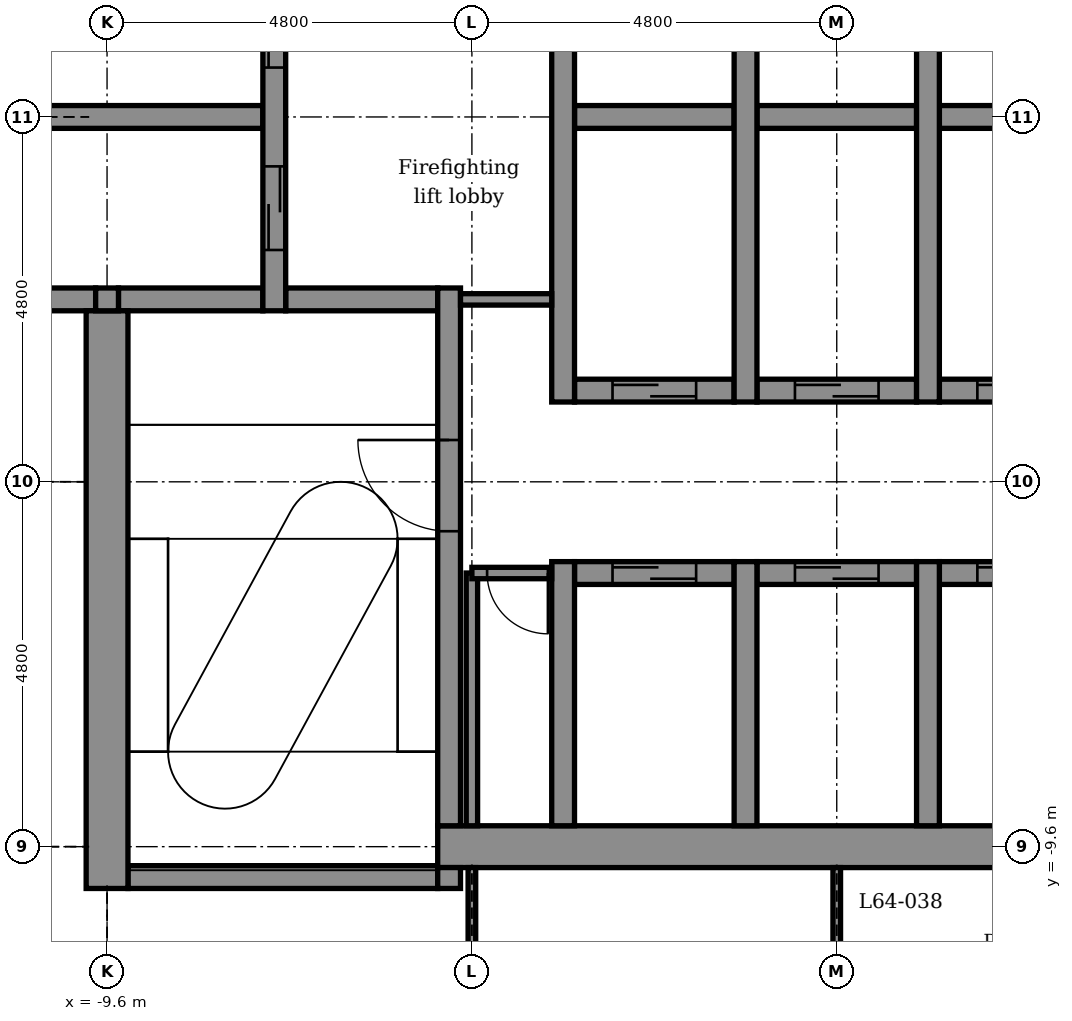
"""IFC4 building model, lengths in metres.
Left out: names, types, materials, properties, quantities, classifications, styles, units other than length and angle.
Written with IfcOpenShell. Run it as: python <this file> out.ifc"""

import sys

from ifc_helpers import new_model, si_unit, direction, frame, frame_2d, origin, place, context, subcontext, project, spatial, rectangle, extrude, element, fill, save


model = new_model("IFC4")
c1 = context("Model", 3, precision=1e-05, world=origin(), true_north=direction((0.0, 1.0)))
c2 = subcontext(c1, "Body", "Model", "MODEL_VIEW")
j1 = project(units=[si_unit("LENGTHUNIT", "METRE"), si_unit("PLANEANGLEUNIT", "RADIAN")], contexts=[c1])
p1 = place(None, origin())
s1 = spatial("IfcSite", under=j1, at=p1, CompositionType="ELEMENT")
p2 = place(p1, origin())
s2 = spatial("IfcBuilding", under=s1, at=p2, CompositionType="ELEMENT")
p3 = place(p2, frame((0.0, 0.0, 285.2)))
s3 = spatial("IfcBuildingStorey", under=s2, at=p3, CompositionType="ELEMENT", Elevation=285.2)
p4 = place(p3, frame((-9.325, -10.0, -0.15), z_axis=(0.0, 0.0, 1.0), x_axis=(1.0, 0.0, 0.0)))
e1 = element("IfcWall", 1, at=p4, inside=s3, PredefinedType="STANDARD", context=c2, shape_type="SweptSolid", body=[
    extrude(rectangle(XDim=4.075, YDim=0.3, at=frame_2d((2.038, 0.0))), origin(), (0.0, 0.0, 1.0), 3.9),
])
p5 = place(p3, frame((-5.25, -9.6, -0.15), z_axis=(0.0, 0.0, 1.0), x_axis=(1.0, 0.0, 0.0)))
e2 = element("IfcWall", 2, at=p5, inside=s3, PredefinedType="SHEAR", context=c2, shape_type="SweptSolid", body=[
    extrude(rectangle(XDim=10.2, YDim=0.55, at=frame_2d((5.1, 0.0))), origin(), (0.0, 0.0, 1.0), 3.9),
])
p6 = place(p5, frame((9.0, 0.0, 0.15)))
e3 = element("IfcOpeningElement", 3, at=p6, cuts=e2, PredefinedType="OPENING", context=c2, shape_type="SweptSolid", body=[
    extrude(rectangle(XDim=0.9, YDim=2.1, at=frame_2d((0.45, 1.05))), frame((0.0, 0.285, 0.0), z_axis=(0.0, -1.0, 0.0), x_axis=(1.0, 0.0, 0.0)), (0.0, 0.0, 1.0), 0.57),
])
p7 = place(p3, frame((-3.45, -6.0, -0.15), z_axis=(0.0, 0.0, 1.0), x_axis=(1.0, 0.0, 0.0)))
e4 = element("IfcWall", 4, at=p7, inside=s3, PredefinedType="STANDARD", context=c2, shape_type="SweptSolid", body=[
    extrude(rectangle(XDim=2.1, YDim=0.3, at=frame_2d((1.05, 0.0))), origin(), (0.0, 0.0, 1.0), 3.9),
])
p8 = place(p7, frame((0.5, 0.0, 0.15)))
e5 = element("IfcOpeningElement", 5, at=p8, cuts=e4, PredefinedType="OPENING", context=c2, shape_type="SweptSolid", body=[
    extrude(rectangle(XDim=1.1, YDim=2.1, at=frame_2d((0.55, 1.05))), frame((0.0, 0.16, 0.0), z_axis=(0.0, -1.0, 0.0), x_axis=(1.0, 0.0, 0.0)), (0.0, 0.0, 1.0), 0.32),
])
p9 = place(p3, frame((-1.05, -6.0, -0.15), z_axis=(0.0, 0.0, 1.0), x_axis=(1.0, 0.0, 0.0)))
e6 = element("IfcWall", 6, at=p9, inside=s3, PredefinedType="STANDARD", context=c2, shape_type="SweptSolid", body=[
    extrude(rectangle(XDim=2.1, YDim=0.3, at=frame_2d((1.05, 0.0))), origin(), (0.0, 0.0, 1.0), 3.9),
])
p10 = place(p9, frame((0.5, 0.0, 0.15)))
e7 = element("IfcOpeningElement", 7, at=p10, cuts=e6, PredefinedType="OPENING", context=c2, shape_type="SweptSolid", body=[
    extrude(rectangle(XDim=1.1, YDim=2.1, at=frame_2d((0.55, 1.05))), frame((0.0, 0.16, 0.0), z_axis=(0.0, -1.0, 0.0), x_axis=(1.0, 0.0, 0.0)), (0.0, 0.0, 1.0), 0.32),
])
p11 = place(p3, frame((1.35, -6.0, -0.15), z_axis=(0.0, 0.0, 1.0), x_axis=(1.0, 0.0, 0.0)))
e8 = element("IfcWall", 8, at=p11, inside=s3, PredefinedType="STANDARD", context=c2, shape_type="SweptSolid", body=[
    extrude(rectangle(XDim=2.1, YDim=0.3, at=frame_2d((1.05, 0.0))), origin(), (0.0, 0.0, 1.0), 3.9),
])
p12 = place(p11, frame((0.5, 0.0, 0.15)))
e9 = element("IfcOpeningElement", 9, at=p12, cuts=e8, PredefinedType="OPENING", context=c2, shape_type="SweptSolid", body=[
    extrude(rectangle(XDim=1.1, YDim=2.1, at=frame_2d((0.55, 1.05))), frame((0.0, 0.16, 0.0), z_axis=(0.0, -1.0, 0.0), x_axis=(1.0, 0.0, 0.0)), (0.0, 0.0, 1.0), 0.32),
])
p13 = place(p3, frame((-3.45, -3.6, -0.15), z_axis=(0.0, 0.0, 1.0), x_axis=(1.0, 0.0, 0.0)))
e10 = element("IfcWall", 10, at=p13, inside=s3, PredefinedType="STANDARD", context=c2, shape_type="SweptSolid", body=[
    extrude(rectangle(XDim=2.1, YDim=0.3, at=frame_2d((1.05, 0.0))), origin(), (0.0, 0.0, 1.0), 3.9),
])
p14 = place(p13, frame((0.5, 0.0, 0.15)))
e11 = element("IfcOpeningElement", 11, at=p14, cuts=e10, PredefinedType="OPENING", context=c2, shape_type="SweptSolid", body=[
    extrude(rectangle(XDim=1.1, YDim=2.1, at=frame_2d((0.55, 1.05))), frame((0.0, 0.16, 0.0), z_axis=(0.0, -1.0, 0.0), x_axis=(1.0, 0.0, 0.0)), (0.0, 0.0, 1.0), 0.32),
])
p15 = place(p3, frame((-1.05, -3.6, -0.15), z_axis=(0.0, 0.0, 1.0), x_axis=(1.0, 0.0, 0.0)))
e12 = element("IfcWall", 12, at=p15, inside=s3, PredefinedType="STANDARD", context=c2, shape_type="SweptSolid", body=[
    extrude(rectangle(XDim=2.1, YDim=0.3, at=frame_2d((1.05, 0.0))), origin(), (0.0, 0.0, 1.0), 3.9),
])
p16 = place(p15, frame((0.5, 0.0, 0.15)))
e13 = element("IfcOpeningElement", 13, at=p16, cuts=e12, PredefinedType="OPENING", context=c2, shape_type="SweptSolid", body=[
    extrude(rectangle(XDim=1.1, YDim=2.1, at=frame_2d((0.55, 1.05))), frame((0.0, 0.16, 0.0), z_axis=(0.0, -1.0, 0.0), x_axis=(1.0, 0.0, 0.0)), (0.0, 0.0, 1.0), 0.32),
])
p17 = place(p3, frame((1.35, -3.6, -0.15), z_axis=(0.0, 0.0, 1.0), x_axis=(1.0, 0.0, 0.0)))
e14 = element("IfcWall", 14, at=p17, inside=s3, PredefinedType="STANDARD", context=c2, shape_type="SweptSolid", body=[
    extrude(rectangle(XDim=2.1, YDim=0.3, at=frame_2d((1.05, 0.0))), origin(), (0.0, 0.0, 1.0), 3.9),
])
p18 = place(p17, frame((0.5, 0.0, 0.15)))
e15 = element("IfcOpeningElement", 15, at=p18, cuts=e14, PredefinedType="OPENING", context=c2, shape_type="SweptSolid", body=[
    extrude(rectangle(XDim=1.1, YDim=2.1, at=frame_2d((0.55, 1.05))), frame((0.0, 0.16, 0.0), z_axis=(0.0, -1.0, 0.0), x_axis=(1.0, 0.0, 0.0)), (0.0, 0.0, 1.0), 0.32),
])
p19 = place(p3, frame((-10.85, -2.4, -0.15), z_axis=(0.0, 0.0, 1.0), x_axis=(1.0, 0.0, 0.0)))
e16 = element("IfcWall", 16, at=p19, inside=s3, PredefinedType="STANDARD", context=c2, shape_type="SweptSolid", body=[
    extrude(rectangle(XDim=1.1, YDim=0.3, at=frame_2d((0.55, 0.0))), origin(), (0.0, 0.0, 1.0), 3.9),
])
p20 = place(p3, frame((-9.45, -2.4, -0.15), z_axis=(0.0, 0.0, 1.0), x_axis=(1.0, 0.0, 0.0)))
e17 = element("IfcWall", 17, at=p20, inside=s3, PredefinedType="STANDARD", context=c2, shape_type="SweptSolid", body=[
    extrude(rectangle(XDim=1.9, YDim=0.3, at=frame_2d((0.95, 0.0))), origin(), (0.0, 0.0, 1.0), 3.9),
])
p21 = place(p3, frame((-7.25, -2.4, -0.15), z_axis=(0.0, 0.0, 1.0), x_axis=(1.0, 0.0, 0.0)))
e18 = element("IfcWall", 18, at=p21, inside=s3, PredefinedType="STANDARD", context=c2, shape_type="SweptSolid", body=[
    extrude(rectangle(XDim=2.0, YDim=0.3, at=frame_2d((1.0, 0.0))), origin(), (0.0, 0.0, 1.0), 3.9),
])
p22 = place(p3, frame((-10.85, 0.0, -0.15), z_axis=(0.0, 0.0, 1.0), x_axis=(1.0, 0.0, 0.0)))
e19 = element("IfcWall", 19, at=p22, inside=s3, PredefinedType="STANDARD", context=c2, shape_type="SweptSolid", body=[
    extrude(rectangle(XDim=3.3, YDim=0.3, at=frame_2d((1.65, 0.0))), origin(), (0.0, 0.0, 1.0), 3.9),
])
p23 = place(p3, frame((-3.45, 0.0, -0.15), z_axis=(0.0, 0.0, 1.0), x_axis=(1.0, 0.0, 0.0)))
e20 = element("IfcWall", 20, at=p23, inside=s3, PredefinedType="STANDARD", context=c2, shape_type="SweptSolid", body=[
    extrude(rectangle(XDim=2.1, YDim=0.3, at=frame_2d((1.05, 0.0))), origin(), (0.0, 0.0, 1.0), 3.9),
])
p24 = place(p3, frame((-1.05, 0.0, -0.15), z_axis=(0.0, 0.0, 1.0), x_axis=(1.0, 0.0, 0.0)))
e21 = element("IfcWall", 21, at=p24, inside=s3, PredefinedType="STANDARD", context=c2, shape_type="SweptSolid", body=[
    extrude(rectangle(XDim=2.1, YDim=0.3, at=frame_2d((1.05, 0.0))), origin(), (0.0, 0.0, 1.0), 3.9),
])
p25 = place(p3, frame((1.35, 0.0, -0.15), z_axis=(0.0, 0.0, 1.0), x_axis=(1.0, 0.0, 0.0)))
e22 = element("IfcWall", 22, at=p25, inside=s3, PredefinedType="STANDARD", context=c2, shape_type="SweptSolid", body=[
    extrude(rectangle(XDim=2.1, YDim=0.3, at=frame_2d((1.05, 0.0))), origin(), (0.0, 0.0, 1.0), 3.9),
])
p26 = place(p3, frame((-9.6, -10.15, -0.15), z_axis=(0.0, 0.0, 1.0), x_axis=(0.0, 1.0, 0.0)))
e23 = element("IfcWall", 23, at=p26, inside=s3, PredefinedType="SHEAR", context=c2, shape_type="SweptSolid", body=[
    extrude(rectangle(XDim=7.6, YDim=0.55, at=frame_2d((3.8, 0.0))), origin(), (0.0, 0.0, 1.0), 3.9),
])
p27 = place(p3, frame((-9.6, -2.55, -0.15), z_axis=(0.0, 0.0, 1.0), x_axis=(0.0, 1.0, 0.0)))
e24 = element("IfcWall", 24, at=p27, inside=s3, PredefinedType="STANDARD", context=c2, shape_type="SweptSolid", body=[
    extrude(rectangle(XDim=0.3, YDim=0.3, at=frame_2d((0.15, 0.0))), origin(), (0.0, 0.0, 1.0), 3.9),
])
p28 = place(p3, frame((-7.4, -2.55, -0.15), z_axis=(0.0, 0.0, 1.0), x_axis=(0.0, 1.0, 0.0)))
e25 = element("IfcWall", 25, at=p28, inside=s3, PredefinedType="STANDARD", context=c2, shape_type="SweptSolid", body=[
    extrude(rectangle(XDim=5.1, YDim=0.3, at=frame_2d((2.55, 0.0))), origin(), (0.0, 0.0, 1.0), 3.9),
])
p29 = place(p28, frame((0.8, 0.0, 0.15)))
e26 = element("IfcOpeningElement", 26, at=p29, cuts=e25, PredefinedType="OPENING", context=c2, shape_type="SweptSolid", body=[
    extrude(rectangle(XDim=1.1, YDim=2.1, at=frame_2d((0.55, 1.05))), frame((0.0, 0.16, 0.0), z_axis=(0.0, -1.0, 0.0), x_axis=(1.0, 0.0, 0.0)), (0.0, 0.0, 1.0), 0.32),
])
p30 = place(p28, frame((3.2, 0.0, 0.15)))
e27 = element("IfcOpeningElement", 27, at=p30, cuts=e25, PredefinedType="OPENING", context=c2, shape_type="SweptSolid", body=[
    extrude(rectangle(XDim=1.1, YDim=2.1, at=frame_2d((0.55, 1.05))), frame((0.0, 0.16, 0.0), z_axis=(0.0, -1.0, 0.0), x_axis=(1.0, 0.0, 0.0)), (0.0, 0.0, 1.0), 0.32),
])
p31 = place(p3, frame((-5.1, -10.15, -0.15), z_axis=(0.0, 0.0, 1.0), x_axis=(0.0, 1.0, 0.0)))
e28 = element("IfcWall", 28, at=p31, inside=s3, PredefinedType="STANDARD", context=c2, shape_type="SweptSolid", body=[
    extrude(rectangle(XDim=0.275, YDim=0.3, at=frame_2d((0.137, 0.0))), origin(), (0.0, 0.0, 1.0), 3.9),
])
p32 = place(p3, frame((-5.1, -9.325, -0.15), z_axis=(0.0, 0.0, 1.0), x_axis=(0.0, 1.0, 0.0)))
e29 = element("IfcWall", 29, at=p32, inside=s3, PredefinedType="STANDARD", context=c2, shape_type="SweptSolid", body=[
    extrude(rectangle(XDim=7.075, YDim=0.3, at=frame_2d((3.538, 0.0))), origin(), (0.0, 0.0, 1.0), 3.9),
])
p33 = place(p32, frame((3.875, 0.0, 0.15)))
e30 = element("IfcOpeningElement", 30, at=p33, cuts=e29, PredefinedType="OPENING", context=c2, shape_type="SweptSolid", body=[
    extrude(rectangle(XDim=1.2, YDim=2.1, at=frame_2d((0.6, 1.05))), frame((0.0, 0.16, 0.0), z_axis=(0.0, -1.0, 0.0), x_axis=(1.0, 0.0, 0.0)), (0.0, 0.0, 1.0), 0.32),
])
p34 = place(p3, frame((-3.6, -9.325, -0.15), z_axis=(0.0, 0.0, 1.0), x_axis=(0.0, 1.0, 0.0)))
e31 = element("IfcWall", 31, at=p34, inside=s3, PredefinedType="STANDARD", context=c2, shape_type="SweptSolid", body=[
    extrude(rectangle(XDim=3.475, YDim=0.3, at=frame_2d((1.737, 0.0))), origin(), (0.0, 0.0, 1.0), 3.9),
])
p35 = place(p3, frame((-3.6, -3.75, -0.15), z_axis=(0.0, 0.0, 1.0), x_axis=(0.0, 1.0, 0.0)))
e32 = element("IfcWall", 32, at=p35, inside=s3, PredefinedType="STANDARD", context=c2, shape_type="SweptSolid", body=[
    extrude(rectangle(XDim=7.5, YDim=0.3, at=frame_2d((3.75, 0.0))), origin(), (0.0, 0.0, 1.0), 3.9),
])
p36 = place(p3, frame((-1.2, -9.325, -0.15), z_axis=(0.0, 0.0, 1.0), x_axis=(0.0, 1.0, 0.0)))
e33 = element("IfcWall", 33, at=p36, inside=s3, PredefinedType="STANDARD", context=c2, shape_type="SweptSolid", body=[
    extrude(rectangle(XDim=3.475, YDim=0.3, at=frame_2d((1.737, 0.0))), origin(), (0.0, 0.0, 1.0), 3.9),
])
p37 = place(p3, frame((-1.2, -3.75, -0.15), z_axis=(0.0, 0.0, 1.0), x_axis=(0.0, 1.0, 0.0)))
e34 = element("IfcWall", 34, at=p37, inside=s3, PredefinedType="STANDARD", context=c2, shape_type="SweptSolid", body=[
    extrude(rectangle(XDim=7.5, YDim=0.3, at=frame_2d((3.75, 0.0))), origin(), (0.0, 0.0, 1.0), 3.9),
])
p38 = place(p3, frame((1.2, -9.325, -0.15), z_axis=(0.0, 0.0, 1.0), x_axis=(0.0, 1.0, 0.0)))
e35 = element("IfcWall", 35, at=p38, inside=s3, PredefinedType="STANDARD", context=c2, shape_type="SweptSolid", body=[
    extrude(rectangle(XDim=3.475, YDim=0.3, at=frame_2d((1.737, 0.0))), origin(), (0.0, 0.0, 1.0), 3.9),
])
p39 = place(p3, frame((1.2, -3.75, -0.15), z_axis=(0.0, 0.0, 1.0), x_axis=(0.0, 1.0, 0.0)))
e36 = element("IfcWall", 36, at=p39, inside=s3, PredefinedType="STANDARD", context=c2, shape_type="SweptSolid", body=[
    extrude(rectangle(XDim=7.5, YDim=0.3, at=frame_2d((3.75, 0.0))), origin(), (0.0, 0.0, 1.0), 3.9),
])
for number, where, z_axis, x_axis in (
    (37, (0.0, -13.0, 0.0), (0.0, 0.0, 1.0), (0.0, 1.0, 0.0)),
    (38, (-4.8, -13.0, 0.0), (0.0, 0.0, 1.0), (0.0, 1.0, 0.0)),
):
    element("IfcWall", number, at=place(p3, frame(where, z_axis=z_axis, x_axis=x_axis)), inside=s3, PredefinedType="PARTITIONING", context=c2, shape_type="SweptSolid", body=[
        extrude(rectangle(XDim=3.125, YDim=0.1, at=frame_2d((1.562, 0.0))), origin(), (0.0, 0.0, 1.0), 3.217),
    ])
p40 = place(p3, frame((-4.8, -9.325, 0.0), z_axis=(0.0, 0.0, 1.0), x_axis=(0.0, 1.0, 0.0)))
e39 = element("IfcWall", 39, at=p40, inside=s3, PredefinedType="PARTITIONING", context=c2, shape_type="SweptSolid", body=[
    extrude(rectangle(XDim=3.325, YDim=0.15, at=frame_2d((1.663, 0.0))), origin(), (0.0, 0.0, 1.0), 3.75),
])
p41 = place(p3, frame((-4.8, -6.0, 0.0), z_axis=(0.0, 0.0, 1.0), x_axis=(1.0, 0.0, 0.0)))
e40 = element("IfcWall", 40, at=p41, inside=s3, PredefinedType="PARTITIONING", context=c2, shape_type="SweptSolid", body=[
    extrude(rectangle(XDim=1.05, YDim=0.15, at=frame_2d((0.525, 0.0))), origin(), (0.0, 0.0, 1.0), 3.75),
])
p42 = place(p41, frame((0.2, 0.0, 0.0)))
e41 = element("IfcOpeningElement", 41, at=p42, cuts=e40, PredefinedType="OPENING", context=c2, shape_type="SweptSolid", body=[
    extrude(rectangle(XDim=0.8, YDim=2.1, at=frame_2d((0.4, 1.05))), frame((0.0, 0.085, 0.0), z_axis=(0.0, -1.0, 0.0), x_axis=(1.0, 0.0, 0.0)), (0.0, 0.0, 1.0), 0.17),
])
p43 = place(p3, frame((-4.95, -2.4, 0.0), z_axis=(0.0, 0.0, 1.0), x_axis=(1.0, 0.0, 0.0)))
e42 = element("IfcWall", 42, at=p43, inside=s3, PredefinedType="PARTITIONING", context=c2, shape_type="SweptSolid", body=[
    extrude(rectangle(XDim=1.2, YDim=0.15, at=frame_2d((0.6, 0.0))), origin(), (0.0, 0.0, 1.0), 3.75),
])
p44 = place(p42, frame((0.8, 0.0, 0.0), z_axis=(0.0, 0.0, 1.0), x_axis=(-1.0, 0.0, 0.0)))
e43 = element("IfcDoor", 43, at=p44, inside=s3, OperationType="SINGLE_SWING_RIGHT", PredefinedType="DOOR", context=c2, shape_type="SweptSolid", body=[
    extrude(rectangle(XDim=0.8, YDim=2.1, at=frame_2d((0.4, 1.05))), frame((0.0, 0.025, 0.0), z_axis=(0.0, -1.0, 0.0), x_axis=(1.0, 0.0, 0.0)), (0.0, 0.0, 1.0), 0.05),
])
fill(e41, e43)
p45 = place(p29, origin())
e44 = element("IfcDoor", 44, at=p45, inside=s3, OperationType="DOUBLE_DOOR_SLIDING", PredefinedType="DOOR", context=c2, shape_type="SweptSolid", body=[
    extrude(rectangle(XDim=1.1, YDim=2.1, at=frame_2d((0.55, 1.05))), frame((0.0, 0.025, 0.0), z_axis=(0.0, -1.0, 0.0), x_axis=(1.0, 0.0, 0.0)), (0.0, 0.0, 1.0), 0.05),
])
fill(e26, e44)
p46 = place(p30, origin())
e45 = element("IfcDoor", 45, at=p46, inside=s3, OperationType="DOUBLE_DOOR_SLIDING", PredefinedType="DOOR", context=c2, shape_type="SweptSolid", body=[
    extrude(rectangle(XDim=1.1, YDim=2.1, at=frame_2d((0.55, 1.05))), frame((0.0, 0.025, 0.0), z_axis=(0.0, -1.0, 0.0), x_axis=(1.0, 0.0, 0.0)), (0.0, 0.0, 1.0), 0.05),
])
fill(e27, e45)
p47 = place(p14, origin())
e46 = element("IfcDoor", 46, at=p47, inside=s3, OperationType="DOUBLE_DOOR_SLIDING", PredefinedType="DOOR", context=c2, shape_type="SweptSolid", body=[
    extrude(rectangle(XDim=1.1, YDim=2.1, at=frame_2d((0.55, 1.05))), frame((0.0, 0.025, 0.0), z_axis=(0.0, -1.0, 0.0), x_axis=(1.0, 0.0, 0.0)), (0.0, 0.0, 1.0), 0.05),
])
fill(e11, e46)
p48 = place(p16, origin())
e47 = element("IfcDoor", 47, at=p48, inside=s3, OperationType="DOUBLE_DOOR_SLIDING", PredefinedType="DOOR", context=c2, shape_type="SweptSolid", body=[
    extrude(rectangle(XDim=1.1, YDim=2.1, at=frame_2d((0.55, 1.05))), frame((0.0, 0.025, 0.0), z_axis=(0.0, -1.0, 0.0), x_axis=(1.0, 0.0, 0.0)), (0.0, 0.0, 1.0), 0.05),
])
fill(e13, e47)
p49 = place(p18, origin())
e48 = element("IfcDoor", 48, at=p49, inside=s3, OperationType="DOUBLE_DOOR_SLIDING", PredefinedType="DOOR", context=c2, shape_type="SweptSolid", body=[
    extrude(rectangle(XDim=1.1, YDim=2.1, at=frame_2d((0.55, 1.05))), frame((0.0, 0.025, 0.0), z_axis=(0.0, -1.0, 0.0), x_axis=(1.0, 0.0, 0.0)), (0.0, 0.0, 1.0), 0.05),
])
fill(e15, e48)
p50 = place(p8, origin())
e49 = element("IfcDoor", 49, at=p50, inside=s3, OperationType="DOUBLE_DOOR_SLIDING", PredefinedType="DOOR", context=c2, shape_type="SweptSolid", body=[
    extrude(rectangle(XDim=1.1, YDim=2.1, at=frame_2d((0.55, 1.05))), frame((0.0, 0.025, 0.0), z_axis=(0.0, -1.0, 0.0), x_axis=(1.0, 0.0, 0.0)), (0.0, 0.0, 1.0), 0.05),
])
fill(e5, e49)
p51 = place(p10, origin())
e50 = element("IfcDoor", 50, at=p51, inside=s3, OperationType="DOUBLE_DOOR_SLIDING", PredefinedType="DOOR", context=c2, shape_type="SweptSolid", body=[
    extrude(rectangle(XDim=1.1, YDim=2.1, at=frame_2d((0.55, 1.05))), frame((0.0, 0.025, 0.0), z_axis=(0.0, -1.0, 0.0), x_axis=(1.0, 0.0, 0.0)), (0.0, 0.0, 1.0), 0.05),
])
fill(e7, e50)
p52 = place(p12, origin())
e51 = element("IfcDoor", 51, at=p52, inside=s3, OperationType="DOUBLE_DOOR_SLIDING", PredefinedType="DOOR", context=c2, shape_type="SweptSolid", body=[
    extrude(rectangle(XDim=1.1, YDim=2.1, at=frame_2d((0.55, 1.05))), frame((0.0, 0.025, 0.0), z_axis=(0.0, -1.0, 0.0), x_axis=(1.0, 0.0, 0.0)), (0.0, 0.0, 1.0), 0.05),
])
fill(e9, e51)
p53 = place(p33, origin())
e52 = element("IfcDoor", 52, at=p53, inside=s3, OperationType="SINGLE_SWING_RIGHT", PredefinedType="DOOR", context=c2, shape_type="SweptSolid", body=[
    extrude(rectangle(XDim=1.2, YDim=2.1, at=frame_2d((0.6, 1.05))), frame((0.0, 0.025, 0.0), z_axis=(0.0, -1.0, 0.0), x_axis=(1.0, 0.0, 0.0)), (0.0, 0.0, 1.0), 0.05),
])
fill(e30, e52)
save(model, sys.argv[1])
